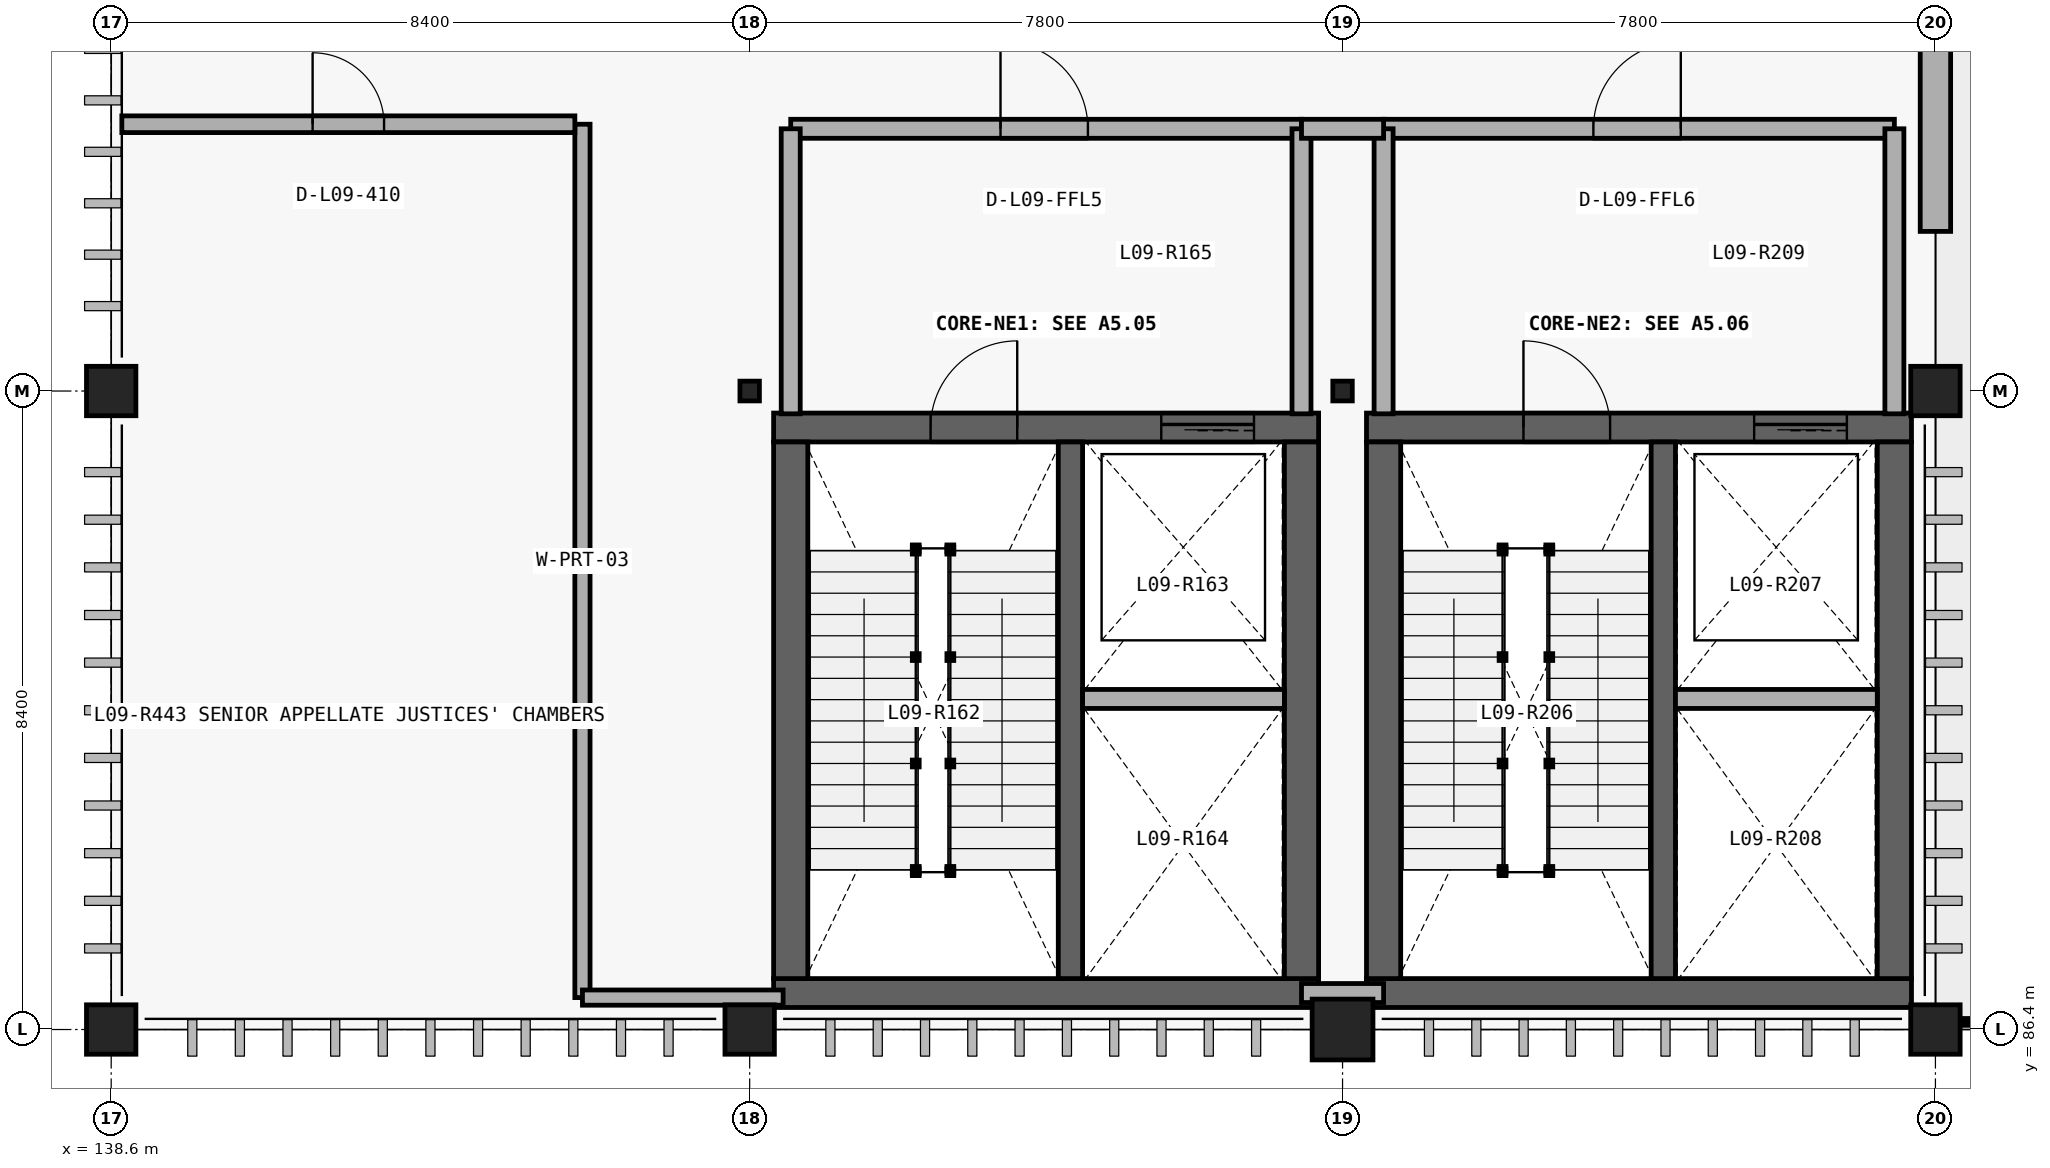
"""IFC4 building model, lengths in metres.
Left out: names, types, materials, properties, quantities, classifications, styles, units other than length and angle.
Written with IfcOpenShell. Run it as: python <this file> out.ifc"""

import sys

from ifc_helpers import new_model, si_unit, direction, frame, frame_2d, origin_with_axes, origin_2d_with_axis, place, context, subcontext, project, spatial, rectangle, circle, i_section, extrude, element, fill, save


model = new_model("IFC4")
c1 = context("Model", 3, precision=1e-05, world=origin_with_axes(), true_north=direction((0.0, 1.0)))
c2 = subcontext(c1, "Body", "Model", "MODEL_VIEW")
j1 = project(units=[si_unit("LENGTHUNIT", "METRE"), si_unit("PLANEANGLEUNIT", "RADIAN")], contexts=[c1])
p1 = place(None, origin_with_axes())
s1 = spatial("IfcSite", under=j1, at=p1, CompositionType="ELEMENT")
p2 = place(p1, origin_with_axes())
s2 = spatial("IfcBuilding", under=s1, at=p2, CompositionType="ELEMENT")
p3 = place(p2, frame((0.0, 0.0, 43.5), z_axis=(0.0, 0.0, 1.0), x_axis=(1.0, 0.0, 0.0)))
s3 = spatial("IfcBuildingStorey", under=s2, at=p3, CompositionType="ELEMENT", Elevation=43.5)
p4 = place(None, frame((162.6, 96.9, 43.5), z_axis=(0.0, 0.0, 1.0), x_axis=(0.0, 1.0, 0.0)))
e1 = element("IfcWall", 1, at=p4, inside=s3, PredefinedType="SOLIDWALL", context=c2, shape_type="SweptSolid", body=[
    extrude(rectangle(XDim=13.3, YDim=0.4, at=frame_2d((6.65, 0.0), x_axis=(1.0, 0.0))), origin_with_axes(), (0.0, 0.0, 1.0), 3.774),
])
p5 = place(None, frame((162.6, 105.0, 43.5), z_axis=(0.0, 0.0, 1.0), x_axis=(0.0, 1.0, 0.0)))
e2 = element("IfcOpeningElement", 2, at=p5, cuts=e1, PredefinedType="OPENING", context=c2, shape_type="SweptSolid", body=[
    extrude(rectangle(XDim=1.1, YDim=2.3, at=frame_2d((0.0, 1.15), x_axis=(1.0, 0.0))), frame((0.0, 0.21, 0.0), z_axis=(0.0, -1.0, 0.0), x_axis=(1.0, 0.0, 0.0)), (0.0, 0.0, 1.0), 0.42),
])
p6 = place(None, frame((147.315, 86.88, 43.5), z_axis=(0.0, 0.0, 1.0), x_axis=(1.0, 0.0, 0.0)))
e3 = element("IfcWall", 3, at=p6, inside=s3, PredefinedType="SHEAR", context=c2, shape_type="SweptSolid", body=[
    extrude(rectangle(XDim=7.17, YDim=0.38, at=frame_2d((3.585, 0.0), x_axis=(1.0, 0.0))), origin_with_axes(), (0.0, 0.0, 1.0), 4.5),
])
p7 = place(None, frame((154.485, 94.32, 43.5), z_axis=(0.0, 0.0, 1.0), x_axis=(-1.0, 0.0, 0.0)))
e4 = element("IfcWall", 4, at=p7, inside=s3, PredefinedType="SHEAR", context=c2, shape_type="SweptSolid", body=[
    extrude(rectangle(XDim=7.17, YDim=0.38, at=frame_2d((3.585, 0.0), x_axis=(1.0, 0.0))), origin_with_axes(), (0.0, 0.0, 1.0), 4.5),
])
p8 = place(None, frame((149.95, 94.32, 43.5), z_axis=(0.0, 0.0, 1.0), x_axis=(-1.0, 0.0, 0.0)))
e5 = element("IfcOpeningElement", 5, at=p8, cuts=e4, PredefinedType="OPENING", context=c2, shape_type="SweptSolid", body=[
    extrude(rectangle(XDim=1.14, YDim=2.18, at=frame_2d((0.0, 1.09), x_axis=(1.0, 0.0))), frame((0.0, 0.2, 0.0), z_axis=(0.0, -1.0, 0.0), x_axis=(1.0, 0.0, 0.0)), (0.0, 0.0, 1.0), 0.4),
])
p9 = place(None, frame((153.025, 94.32, 43.5), z_axis=(0.0, 0.0, 1.0), x_axis=(-1.0, 0.0, 0.0)))
e6 = element("IfcOpeningElement", 6, at=p9, cuts=e4, PredefinedType="OPENING", context=c2, shape_type="SweptSolid", body=[
    extrude(rectangle(XDim=1.22, YDim=2.28, at=frame_2d((0.0, 1.14), x_axis=(1.0, 0.0))), frame((0.0, 0.2, 0.0), z_axis=(0.0, -1.0, 0.0), x_axis=(1.0, 0.0, 0.0)), (0.0, 0.0, 1.0), 0.4),
])
for number, where, z_axis, x_axis in (
    (7, (154.26, 87.07, 43.5), (0.0, 0.0, 1.0), (0.0, 1.0, 0.0)),
    (8, (147.54, 94.13, 43.5), (0.0, 0.0, 1.0), (0.0, -1.0, 0.0)),
):
    element("IfcWall", number, at=place(None, frame(where, z_axis=z_axis, x_axis=x_axis)), inside=s3, PredefinedType="SHEAR", context=c2, shape_type="SweptSolid", body=[
        extrude(rectangle(XDim=7.06, YDim=0.45, at=frame_2d((3.53, 0.0), x_axis=(1.0, 0.0))), origin_with_axes(), (0.0, 0.0, 1.0), 4.5),
    ])
p10 = place(None, frame((151.22, 87.07, 43.5), z_axis=(0.0, 0.0, 1.0), x_axis=(0.0, 1.0, 0.0)))
e9 = element("IfcWall", 9, at=p10, inside=s3, PredefinedType="SHEAR", context=c2, shape_type="SweptSolid", body=[
    extrude(rectangle(XDim=7.06, YDim=0.32, at=frame_2d((3.53, 0.0), x_axis=(1.0, 0.0))), origin_with_axes(), (0.0, 0.0, 1.0), 4.5),
])
p11 = place(None, frame((151.38, 90.749, 43.5), z_axis=(0.0, 0.0, 1.0), x_axis=(1.0, 0.0, 0.0)))
e10 = element("IfcWall", 10, at=p11, inside=s3, PredefinedType="PARTITIONING", context=c2, shape_type="SweptSolid", body=[
    extrude(rectangle(XDim=2.655, YDim=0.25, at=frame_2d((1.327, 0.0), x_axis=(1.0, 0.0))), origin_with_axes(), (0.0, 0.0, 1.0), 4.18),
])
p12 = place(None, frame((154.26, 98.25, 43.5), z_axis=(0.0, 0.0, 1.0), x_axis=(-1.0, 0.0, 0.0)))
e11 = element("IfcWall", 11, at=p12, inside=s3, PredefinedType="PARTITIONING", context=c2, shape_type="SweptSolid", body=[
    extrude(rectangle(XDim=6.72, YDim=0.25, at=frame_2d((3.36, 0.0), x_axis=(1.0, 0.0))), origin_with_axes(), (0.0, 0.0, 1.0), 4.18),
])
p13 = place(None, frame((150.875, 98.25, 43.5), z_axis=(0.0, 0.0, 1.0), x_axis=(-1.0, 0.0, 0.0)))
e12 = element("IfcOpeningElement", 12, at=p13, cuts=e11, PredefinedType="OPENING", context=c2, shape_type="SweptSolid", body=[
    extrude(rectangle(XDim=1.15, YDim=2.25, at=frame_2d((0.0, 1.125), x_axis=(1.0, 0.0))), frame((0.0, 0.135, 0.0), z_axis=(0.0, -1.0, 0.0), x_axis=(1.0, 0.0, 0.0)), (0.0, 0.0, 1.0), 0.27),
])
for number, where, z_axis, x_axis in (
    (13, (147.54, 94.5, 43.5), (0.0, 0.0, 1.0), (0.0, 1.0, 0.0)),
    (14, (154.26, 94.5, 43.5), (0.0, 0.0, 1.0), (0.0, 1.0, 0.0)),
):
    element("IfcWall", number, at=place(None, frame(where, z_axis=z_axis, x_axis=x_axis)), inside=s3, PredefinedType="PARTITIONING", context=c2, shape_type="SweptSolid", body=[
        extrude(rectangle(XDim=3.75, YDim=0.25, at=frame_2d((1.875, 0.0), x_axis=(1.0, 0.0))), origin_with_axes(), (0.0, 0.0, 1.0), 4.18),
    ])
p14 = place(None, frame((155.115, 86.88, 43.5), z_axis=(0.0, 0.0, 1.0), x_axis=(1.0, 0.0, 0.0)))
e15 = element("IfcWall", 15, at=p14, inside=s3, PredefinedType="SHEAR", context=c2, shape_type="SweptSolid", body=[
    extrude(rectangle(XDim=7.17, YDim=0.38, at=frame_2d((3.585, 0.0), x_axis=(1.0, 0.0))), origin_with_axes(), (0.0, 0.0, 1.0), 4.5),
])
p15 = place(None, frame((162.285, 94.32, 43.5), z_axis=(0.0, 0.0, 1.0), x_axis=(-1.0, 0.0, 0.0)))
e16 = element("IfcWall", 16, at=p15, inside=s3, PredefinedType="SHEAR", context=c2, shape_type="SweptSolid", body=[
    extrude(rectangle(XDim=7.17, YDim=0.38, at=frame_2d((3.585, 0.0), x_axis=(1.0, 0.0))), origin_with_axes(), (0.0, 0.0, 1.0), 4.5),
])
p16 = place(None, frame((157.75, 94.32, 43.5), z_axis=(0.0, 0.0, 1.0), x_axis=(-1.0, 0.0, 0.0)))
e17 = element("IfcOpeningElement", 17, at=p16, cuts=e16, PredefinedType="OPENING", context=c2, shape_type="SweptSolid", body=[
    extrude(rectangle(XDim=1.14, YDim=2.18, at=frame_2d((0.0, 1.09), x_axis=(1.0, 0.0))), frame((0.0, 0.2, 0.0), z_axis=(0.0, -1.0, 0.0), x_axis=(1.0, 0.0, 0.0)), (0.0, 0.0, 1.0), 0.4),
])
p17 = place(None, frame((160.825, 94.32, 43.5), z_axis=(0.0, 0.0, 1.0), x_axis=(-1.0, 0.0, 0.0)))
e18 = element("IfcOpeningElement", 18, at=p17, cuts=e16, PredefinedType="OPENING", context=c2, shape_type="SweptSolid", body=[
    extrude(rectangle(XDim=1.22, YDim=2.28, at=frame_2d((0.0, 1.14), x_axis=(1.0, 0.0))), frame((0.0, 0.2, 0.0), z_axis=(0.0, -1.0, 0.0), x_axis=(1.0, 0.0, 0.0)), (0.0, 0.0, 1.0), 0.4),
])
for number, where, z_axis, x_axis in (
    (19, (162.06, 87.07, 43.5), (0.0, 0.0, 1.0), (0.0, 1.0, 0.0)),
    (20, (155.34, 94.13, 43.5), (0.0, 0.0, 1.0), (0.0, -1.0, 0.0)),
):
    element("IfcWall", number, at=place(None, frame(where, z_axis=z_axis, x_axis=x_axis)), inside=s3, PredefinedType="SHEAR", context=c2, shape_type="SweptSolid", body=[
        extrude(rectangle(XDim=7.06, YDim=0.45, at=frame_2d((3.53, 0.0), x_axis=(1.0, 0.0))), origin_with_axes(), (0.0, 0.0, 1.0), 4.5),
    ])
p18 = place(None, frame((159.02, 87.07, 43.5), z_axis=(0.0, 0.0, 1.0), x_axis=(0.0, 1.0, 0.0)))
e21 = element("IfcWall", 21, at=p18, inside=s3, PredefinedType="SHEAR", context=c2, shape_type="SweptSolid", body=[
    extrude(rectangle(XDim=7.06, YDim=0.32, at=frame_2d((3.53, 0.0), x_axis=(1.0, 0.0))), origin_with_axes(), (0.0, 0.0, 1.0), 4.5),
])
p19 = place(None, frame((159.18, 90.749, 43.5), z_axis=(0.0, 0.0, 1.0), x_axis=(1.0, 0.0, 0.0)))
e22 = element("IfcWall", 22, at=p19, inside=s3, PredefinedType="PARTITIONING", context=c2, shape_type="SweptSolid", body=[
    extrude(rectangle(XDim=2.655, YDim=0.25, at=frame_2d((1.327, 0.0), x_axis=(1.0, 0.0))), origin_with_axes(), (0.0, 0.0, 1.0), 4.18),
])
p20 = place(None, frame((162.06, 98.25, 43.5), z_axis=(0.0, 0.0, 1.0), x_axis=(-1.0, 0.0, 0.0)))
e23 = element("IfcWall", 23, at=p20, inside=s3, PredefinedType="PARTITIONING", context=c2, shape_type="SweptSolid", body=[
    extrude(rectangle(XDim=6.72, YDim=0.25, at=frame_2d((3.36, 0.0), x_axis=(1.0, 0.0))), origin_with_axes(), (0.0, 0.0, 1.0), 4.18),
])
p21 = place(None, frame((158.675, 98.25, 43.5), z_axis=(0.0, 0.0, 1.0), x_axis=(-1.0, 0.0, 0.0)))
e24 = element("IfcOpeningElement", 24, at=p21, cuts=e23, PredefinedType="OPENING", context=c2, shape_type="SweptSolid", body=[
    extrude(rectangle(XDim=1.15, YDim=2.25, at=frame_2d((0.0, 1.125), x_axis=(1.0, 0.0))), frame((0.0, 0.135, 0.0), z_axis=(0.0, -1.0, 0.0), x_axis=(1.0, 0.0, 0.0)), (0.0, 0.0, 1.0), 0.27),
])
for number, where, z_axis, x_axis in (
    (25, (155.34, 94.5, 43.5), (0.0, 0.0, 1.0), (0.0, 1.0, 0.0)),
    (26, (162.06, 94.5, 43.5), (0.0, 0.0, 1.0), (0.0, 1.0, 0.0)),
):
    element("IfcWall", number, at=place(None, frame(where, z_axis=z_axis, x_axis=x_axis)), inside=s3, PredefinedType="PARTITIONING", context=c2, shape_type="SweptSolid", body=[
        extrude(rectangle(XDim=3.75, YDim=0.25, at=frame_2d((1.875, 0.0), x_axis=(1.0, 0.0))), origin_with_axes(), (0.0, 0.0, 1.0), 4.18),
    ])
for number, where, z_axis, x_axis in (
    (27, (154.26, 98.25, 43.5), (0.0, 0.0, 1.0), (1.0, 0.0, 0.0)),
    (28, (154.26, 86.88, 43.5), (0.0, 0.0, 1.0), (1.0, 0.0, 0.0)),
):
    element("IfcWall", number, at=place(None, frame(where, z_axis=z_axis, x_axis=x_axis)), inside=s3, PredefinedType="PARTITIONING", context=c2, shape_type="SweptSolid", body=[
        extrude(rectangle(XDim=1.08, YDim=0.25, at=frame_2d((0.54, 0.0), x_axis=(1.0, 0.0))), origin_with_axes(), (0.0, 0.0, 1.0), 4.18),
    ])
p22 = place(None, frame((144.8, 86.82, 43.5), z_axis=(0.0, 0.0, 1.0), x_axis=(0.0, 1.0, 0.0)))
e29 = element("IfcWall", 29, at=p22, inside=s3, PredefinedType="PARTITIONING", context=c2, shape_type="SweptSolid", body=[
    extrude(rectangle(XDim=11.49, YDim=0.2, at=frame_2d((5.745, 0.0), x_axis=(1.0, 0.0))), origin_with_axes(), (0.0, 0.0, 1.0), 4.18),
])
p23 = place(None, frame((144.8, 86.82, 43.5), z_axis=(0.0, 0.0, 1.0), x_axis=(1.0, 0.0, 0.0)))
e30 = element("IfcWall", 30, at=p23, inside=s3, PredefinedType="PARTITIONING", context=c2, shape_type="SweptSolid", body=[
    extrude(rectangle(XDim=2.64, YDim=0.2, at=frame_2d((1.32, 0.0), x_axis=(1.0, 0.0))), origin_with_axes(), (0.0, 0.0, 1.0), 4.18),
])
p24 = place(None, frame((138.74, 98.31, 43.5), z_axis=(0.0, 0.0, 1.0), x_axis=(1.0, 0.0, 0.0)))
e31 = element("IfcWall", 31, at=p24, inside=s3, PredefinedType="PARTITIONING", context=c2, shape_type="SweptSolid", body=[
    extrude(rectangle(XDim=5.96, YDim=0.22, at=frame_2d((2.98, 0.0), x_axis=(1.0, 0.0))), origin_with_axes(), (0.0, 0.0, 1.0), 4.18),
])
p25 = place(None, frame((141.72, 98.31, 43.5), z_axis=(0.0, 0.0, 1.0), x_axis=(1.0, 0.0, 0.0)))
e32 = element("IfcOpeningElement", 32, at=p25, cuts=e31, PredefinedType="OPENING", context=c2, shape_type="SweptSolid", body=[
    extrude(rectangle(XDim=0.94, YDim=2.3, at=frame_2d((0.0, 1.15), x_axis=(1.0, 0.0))), frame((0.0, 0.12, 0.0), z_axis=(0.0, -1.0, 0.0), x_axis=(1.0, 0.0, 0.0)), (0.0, 0.0, 1.0), 0.24),
])
for number, where, z_axis, x_axis in (
    (33, (138.6, 86.4, 43.5), (0.0, 0.0, 1.0), (1.0, 0.0, 0.0)),
    (34, (138.6, 94.8, 43.5), (0.0, 0.0, 1.0), (1.0, 0.0, 0.0)),
    (35, (147.0, 86.4, 43.5), (0.0, 0.0, 1.0), (1.0, 0.0, 0.0)),
):
    element("IfcColumn", number, at=place(None, frame(where, z_axis=z_axis, x_axis=x_axis)), inside=s3, PredefinedType="COLUMN", context=c2, shape_type="SweptSolid", body=[
        extrude(circle(Radius=0.325, at=origin_2d_with_axis()), origin_with_axes(), (0.0, 0.0, 1.0), 4.5),
    ])
p26 = place(None, frame((147.0, 94.8, 43.5), z_axis=(0.0, 0.0, 1.0), x_axis=(1.0, 0.0, 0.0)))
e36 = element("IfcColumn", 36, at=p26, inside=s3, PredefinedType="COLUMN", context=c2, shape_type="SweptSolid", body=[
    extrude(i_section(OverallWidth=0.256, OverallDepth=0.26, WebThickness=0.011, FlangeThickness=0.017, at=origin_2d_with_axis()), origin_with_axes(), (0.0, 0.0, 1.0), 4.5),
])
p27 = place(None, frame((154.8, 86.4, 43.5), z_axis=(0.0, 0.0, 1.0), x_axis=(1.0, 0.0, 0.0)))
e37 = element("IfcColumn", 37, at=p27, inside=s3, PredefinedType="COLUMN", context=c2, shape_type="SweptSolid", body=[
    extrude(circle(Radius=0.4, at=origin_2d_with_axis()), origin_with_axes(), (0.0, 0.0, 1.0), 4.5),
])
p28 = place(None, frame((154.8, 94.8, 43.5), z_axis=(0.0, 0.0, 1.0), x_axis=(1.0, 0.0, 0.0)))
e38 = element("IfcColumn", 38, at=p28, inside=s3, PredefinedType="COLUMN", context=c2, shape_type="SweptSolid", body=[
    extrude(i_section(OverallWidth=0.256, OverallDepth=0.26, WebThickness=0.011, FlangeThickness=0.017, at=origin_2d_with_axis()), origin_with_axes(), (0.0, 0.0, 1.0), 4.5),
])
for number, where, z_axis, x_axis in (
    (39, (162.6, 86.4, 43.5), (0.0, 0.0, 1.0), (1.0, 0.0, 0.0)),
    (40, (162.6, 94.8, 43.5), (0.0, 0.0, 1.0), (1.0, 0.0, 0.0)),
):
    element("IfcColumn", number, at=place(None, frame(where, z_axis=z_axis, x_axis=x_axis)), inside=s3, PredefinedType="COLUMN", context=c2, shape_type="SweptSolid", body=[
        extrude(circle(Radius=0.325, at=origin_2d_with_axis()), origin_with_axes(), (0.0, 0.0, 1.0), 4.5),
    ])
p29 = place(None, frame((149.95, 94.32, 43.5), z_axis=(0.0, 0.0, 1.0), x_axis=(1.0, 0.0, 0.0)))
e41 = element("IfcDoor", 41, at=p29, inside=s3, OperationType="SINGLE_SWING_LEFT", PredefinedType="DOOR", context=c2, shape_type="SweptSolid", body=[
    extrude(rectangle(XDim=1.14, YDim=2.18, at=frame_2d((0.0, 1.09), x_axis=(1.0, 0.0))), frame((0.0, 0.04, 0.0), z_axis=(0.0, -1.0, 0.0), x_axis=(1.0, 0.0, 0.0)), (0.0, 0.0, 1.0), 0.08),
])
fill(e5, e41)
p30 = place(None, frame((153.025, 94.32, 43.5), z_axis=(0.0, 0.0, 1.0), x_axis=(1.0, 0.0, 0.0)))
e42 = element("IfcDoor", 42, at=p30, inside=s3, OperationType="SLIDING_TO_LEFT", PredefinedType="DOOR", context=c2, shape_type="SweptSolid", body=[
    extrude(rectangle(XDim=1.22, YDim=2.28, at=frame_2d((0.0, 1.14), x_axis=(1.0, 0.0))), frame((0.0, 0.04, 0.0), z_axis=(0.0, -1.0, 0.0), x_axis=(1.0, 0.0, 0.0)), (0.0, 0.0, 1.0), 0.08),
])
fill(e6, e42)
p31 = place(None, frame((150.875, 98.25, 43.5), z_axis=(0.0, 0.0, 1.0), x_axis=(1.0, 0.0, 0.0)))
e43 = element("IfcDoor", 43, at=p31, inside=s3, OperationType="SINGLE_SWING_RIGHT", PredefinedType="DOOR", context=c2, shape_type="SweptSolid", body=[
    extrude(rectangle(XDim=1.15, YDim=2.25, at=frame_2d((0.0, 1.125), x_axis=(1.0, 0.0))), frame((0.0, 0.04, 0.0), z_axis=(0.0, -1.0, 0.0), x_axis=(1.0, 0.0, 0.0)), (0.0, 0.0, 1.0), 0.08),
])
fill(e12, e43)
p32 = place(None, frame((157.75, 94.32, 43.5), z_axis=(0.0, 0.0, 1.0), x_axis=(1.0, 0.0, 0.0)))
e44 = element("IfcDoor", 44, at=p32, inside=s3, OperationType="SINGLE_SWING_RIGHT", PredefinedType="DOOR", context=c2, shape_type="SweptSolid", body=[
    extrude(rectangle(XDim=1.14, YDim=2.18, at=frame_2d((0.0, 1.09), x_axis=(1.0, 0.0))), frame((0.0, 0.04, 0.0), z_axis=(0.0, -1.0, 0.0), x_axis=(1.0, 0.0, 0.0)), (0.0, 0.0, 1.0), 0.08),
])
fill(e17, e44)
p33 = place(None, frame((160.825, 94.32, 43.5), z_axis=(0.0, 0.0, 1.0), x_axis=(1.0, 0.0, 0.0)))
e45 = element("IfcDoor", 45, at=p33, inside=s3, OperationType="SLIDING_TO_LEFT", PredefinedType="DOOR", context=c2, shape_type="SweptSolid", body=[
    extrude(rectangle(XDim=1.22, YDim=2.28, at=frame_2d((0.0, 1.14), x_axis=(1.0, 0.0))), frame((0.0, 0.04, 0.0), z_axis=(0.0, -1.0, 0.0), x_axis=(1.0, 0.0, 0.0)), (0.0, 0.0, 1.0), 0.08),
])
fill(e18, e45)
p34 = place(None, frame((158.675, 98.25, 43.5), z_axis=(0.0, 0.0, 1.0), x_axis=(1.0, 0.0, 0.0)))
e46 = element("IfcDoor", 46, at=p34, inside=s3, OperationType="SINGLE_SWING_LEFT", PredefinedType="DOOR", context=c2, shape_type="SweptSolid", body=[
    extrude(rectangle(XDim=1.15, YDim=2.25, at=frame_2d((0.0, 1.125), x_axis=(1.0, 0.0))), frame((0.0, 0.04, 0.0), z_axis=(0.0, -1.0, 0.0), x_axis=(1.0, 0.0, 0.0)), (0.0, 0.0, 1.0), 0.08),
])
fill(e24, e46)
p35 = place(None, frame((141.72, 98.31, 43.5), z_axis=(0.0, 0.0, 1.0), x_axis=(1.0, 0.0, 0.0)))
e47 = element("IfcDoor", 47, at=p35, inside=s3, OperationType="SINGLE_SWING_LEFT", PredefinedType="DOOR", context=c2, shape_type="SweptSolid", body=[
    extrude(rectangle(XDim=0.94, YDim=2.3, at=frame_2d((0.0, 1.15), x_axis=(1.0, 0.0))), frame((0.0, 0.04, 0.0), z_axis=(0.0, -1.0, 0.0), x_axis=(1.0, 0.0, 0.0)), (0.0, 0.0, 1.0), 0.08),
])
fill(e32, e47)
save(model, sys.argv[1])
